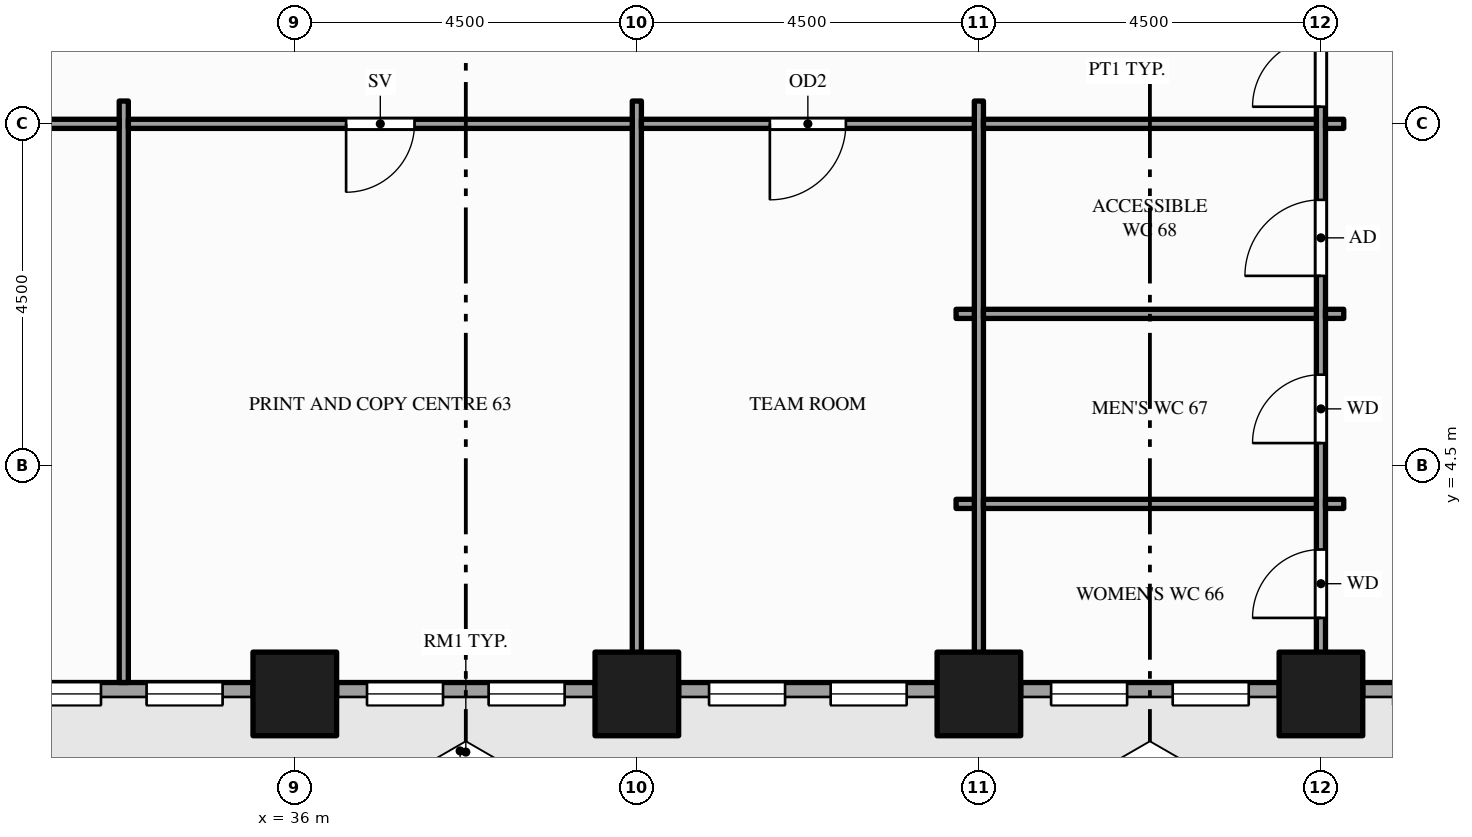
"""IFC4 building model, lengths in metres.
Left out: names, types, materials, properties, quantities, classifications, styles, units other than length and angle.
Written with IfcOpenShell. Run it as: python <this file> out.ifc"""

import sys

from ifc_helpers import new_model, si_unit, direction, frame, frame_2d, origin, origin_2d, place, context, subcontext, project, spatial, rectangle, hollow_rectangle, extrude, element, fill, save


model = new_model("IFC4")
c1 = context("Model", 3, precision=1e-05, world=origin(), true_north=direction((0.0, 1.0)))
c2 = subcontext(c1, "Body", "Model", "MODEL_VIEW")
j1 = project(units=[si_unit("LENGTHUNIT", "METRE"), si_unit("PLANEANGLEUNIT", "RADIAN")], contexts=[c1])
p1 = place(None, origin())
s1 = spatial("IfcSite", under=j1, at=p1, CompositionType="ELEMENT")
p2 = place(p1, origin())
s2 = spatial("IfcBuilding", under=s1, at=p2, CompositionType="ELEMENT")
p3 = place(p2, frame((0.0, 0.0, 29.0)))
s3 = spatial("IfcBuildingStorey", under=s2, at=p3, CompositionType="ELEMENT", Elevation=29.0)
for number, where, z_axis, x_axis in (
    (1, (36.0, 1.5, -0.3), (0.0, 0.0, 1.0), (1.0, 0.0, 0.0)),
    (2, (40.5, 1.5, -0.3), (0.0, 0.0, 1.0), (1.0, 0.0, 0.0)),
    (3, (45.0, 1.5, -0.3), (0.0, 0.0, 1.0), (1.0, 0.0, 0.0)),
    (4, (49.5, 1.5, -0.3), (0.0, 0.0, 1.0), (1.0, 0.0, 0.0)),
):
    element("IfcColumn", number, at=place(p3, frame(where, z_axis=z_axis, x_axis=x_axis)), inside=s3, PredefinedType="COLUMN", context=c2, shape_type="SweptSolid", body=[
        extrude(hollow_rectangle(XDim=1.1, YDim=1.1, WallThickness=0.06, at=origin_2d()), origin(), (0.0, 0.0, 1.0), 4.15),
    ])
p4 = place(p3, frame((32.05, 1.5, 0.0), z_axis=(0.0, 0.0, 1.0), x_axis=(1.0, 0.0, 0.0)))
e5 = element("IfcWall", 5, at=p4, inside=s3, PredefinedType="STANDARD", context=c2, shape_type="SweptSolid", body=[
    extrude(rectangle(XDim=3.4, YDim=0.3, at=frame_2d((1.7, 0.0))), origin(), (0.0, 0.0, 1.0), 3.144),
])
p5 = place(p4, frame((0.4, 0.0, 0.9)))
e6 = element("IfcOpeningElement", 6, at=p5, cuts=e5, PredefinedType="OPENING", context=c2, shape_type="SweptSolid", body=[
    extrude(rectangle(XDim=1.0, YDim=2.0, at=frame_2d((0.5, 1.0))), frame((0.0, 0.16, 0.0), z_axis=(0.0, -1.0, 0.0), x_axis=(1.0, 0.0, 0.0)), (0.0, 0.0, 1.0), 0.32),
])
p6 = place(p4, frame((2.0, 0.0, 0.9)))
e7 = element("IfcOpeningElement", 7, at=p6, cuts=e5, PredefinedType="OPENING", context=c2, shape_type="SweptSolid", body=[
    extrude(rectangle(XDim=1.0, YDim=2.0, at=frame_2d((0.5, 1.0))), frame((0.0, 0.16, 0.0), z_axis=(0.0, -1.0, 0.0), x_axis=(1.0, 0.0, 0.0)), (0.0, 0.0, 1.0), 0.32),
])
p7 = place(p3, frame((36.55, 1.5, 0.0), z_axis=(0.0, 0.0, 1.0), x_axis=(1.0, 0.0, 0.0)))
e8 = element("IfcWall", 8, at=p7, inside=s3, PredefinedType="STANDARD", context=c2, shape_type="SweptSolid", body=[
    extrude(rectangle(XDim=3.4, YDim=0.3, at=frame_2d((1.7, 0.0))), origin(), (0.0, 0.0, 1.0), 3.144),
])
p8 = place(p7, frame((0.4, 0.0, 0.9)))
e9 = element("IfcOpeningElement", 9, at=p8, cuts=e8, PredefinedType="OPENING", context=c2, shape_type="SweptSolid", body=[
    extrude(rectangle(XDim=1.0, YDim=2.0, at=frame_2d((0.5, 1.0))), frame((0.0, 0.16, 0.0), z_axis=(0.0, -1.0, 0.0), x_axis=(1.0, 0.0, 0.0)), (0.0, 0.0, 1.0), 0.32),
])
p9 = place(p7, frame((2.0, 0.0, 0.9)))
e10 = element("IfcOpeningElement", 10, at=p9, cuts=e8, PredefinedType="OPENING", context=c2, shape_type="SweptSolid", body=[
    extrude(rectangle(XDim=1.0, YDim=2.0, at=frame_2d((0.5, 1.0))), frame((0.0, 0.16, 0.0), z_axis=(0.0, -1.0, 0.0), x_axis=(1.0, 0.0, 0.0)), (0.0, 0.0, 1.0), 0.32),
])
p10 = place(p3, frame((41.05, 1.5, 0.0), z_axis=(0.0, 0.0, 1.0), x_axis=(1.0, 0.0, 0.0)))
e11 = element("IfcWall", 11, at=p10, inside=s3, PredefinedType="STANDARD", context=c2, shape_type="SweptSolid", body=[
    extrude(rectangle(XDim=3.4, YDim=0.3, at=frame_2d((1.7, 0.0))), origin(), (0.0, 0.0, 1.0), 3.144),
])
p11 = place(p10, frame((0.4, 0.0, 0.9)))
e12 = element("IfcOpeningElement", 12, at=p11, cuts=e11, PredefinedType="OPENING", context=c2, shape_type="SweptSolid", body=[
    extrude(rectangle(XDim=1.0, YDim=2.0, at=frame_2d((0.5, 1.0))), frame((0.0, 0.16, 0.0), z_axis=(0.0, -1.0, 0.0), x_axis=(1.0, 0.0, 0.0)), (0.0, 0.0, 1.0), 0.32),
])
p12 = place(p10, frame((2.0, 0.0, 0.9)))
e13 = element("IfcOpeningElement", 13, at=p12, cuts=e11, PredefinedType="OPENING", context=c2, shape_type="SweptSolid", body=[
    extrude(rectangle(XDim=1.0, YDim=2.0, at=frame_2d((0.5, 1.0))), frame((0.0, 0.16, 0.0), z_axis=(0.0, -1.0, 0.0), x_axis=(1.0, 0.0, 0.0)), (0.0, 0.0, 1.0), 0.32),
])
p13 = place(p3, frame((45.55, 1.5, 0.0), z_axis=(0.0, 0.0, 1.0), x_axis=(1.0, 0.0, 0.0)))
e14 = element("IfcWall", 14, at=p13, inside=s3, PredefinedType="STANDARD", context=c2, shape_type="SweptSolid", body=[
    extrude(rectangle(XDim=3.4, YDim=0.3, at=frame_2d((1.7, 0.0))), origin(), (0.0, 0.0, 1.0), 3.144),
])
p14 = place(p13, frame((0.4, 0.0, 0.9)))
e15 = element("IfcOpeningElement", 15, at=p14, cuts=e14, PredefinedType="OPENING", context=c2, shape_type="SweptSolid", body=[
    extrude(rectangle(XDim=1.0, YDim=2.0, at=frame_2d((0.5, 1.0))), frame((0.0, 0.16, 0.0), z_axis=(0.0, -1.0, 0.0), x_axis=(1.0, 0.0, 0.0)), (0.0, 0.0, 1.0), 0.32),
])
p15 = place(p13, frame((2.0, 0.0, 0.9)))
e16 = element("IfcOpeningElement", 16, at=p15, cuts=e14, PredefinedType="OPENING", context=c2, shape_type="SweptSolid", body=[
    extrude(rectangle(XDim=1.0, YDim=2.0, at=frame_2d((0.5, 1.0))), frame((0.0, 0.16, 0.0), z_axis=(0.0, -1.0, 0.0), x_axis=(1.0, 0.0, 0.0)), (0.0, 0.0, 1.0), 0.32),
])
p16 = place(p3, frame((50.05, 1.5, 0.0), z_axis=(0.0, 0.0, 1.0), x_axis=(1.0, 0.0, 0.0)))
e17 = element("IfcWall", 17, at=p16, inside=s3, PredefinedType="STANDARD", context=c2, shape_type="SweptSolid", body=[
    extrude(rectangle(XDim=3.95, YDim=0.3, at=frame_2d((1.975, 0.0))), origin(), (0.0, 0.0, 1.0), 3.144),
])
p17 = place(p16, frame((0.4, 0.0, 0.9)))
e18 = element("IfcOpeningElement", 18, at=p17, cuts=e17, PredefinedType="OPENING", context=c2, shape_type="SweptSolid", body=[
    extrude(rectangle(XDim=1.0, YDim=2.0, at=frame_2d((0.5, 1.0))), frame((0.0, 0.16, 0.0), z_axis=(0.0, -1.0, 0.0), x_axis=(1.0, 0.0, 0.0)), (0.0, 0.0, 1.0), 0.32),
])
p18 = place(p16, frame((2.0, 0.0, 0.9)))
e19 = element("IfcOpeningElement", 19, at=p18, cuts=e17, PredefinedType="OPENING", context=c2, shape_type="SweptSolid", body=[
    extrude(rectangle(XDim=1.55, YDim=2.0, at=frame_2d((0.775, 1.0))), frame((0.0, 0.16, 0.0), z_axis=(0.0, -1.0, 0.0), x_axis=(1.0, 0.0, 0.0)), (0.0, 0.0, 1.0), 0.32),
])
for number, where, z_axis, x_axis in (
    (20, (33.75, 1.65, 0.0), (0.0, 0.0, 1.0), (0.0, 1.0, 0.0)),
    (21, (40.5, 1.65, 0.0), (0.0, 0.0, 1.0), (0.0, 1.0, 0.0)),
    (22, (45.0, 1.65, 0.0), (0.0, 0.0, 1.0), (0.0, 1.0, 0.0)),
):
    element("IfcWall", number, at=place(p3, frame(where, z_axis=z_axis, x_axis=x_axis)), inside=s3, PredefinedType="PARTITIONING", context=c2, shape_type="SweptSolid", body=[
        extrude(rectangle(XDim=7.65, YDim=0.12, at=frame_2d((3.825, 0.0))), origin(), (0.0, 0.0, 1.0), 2.938),
    ])
p19 = place(p3, frame((49.5, 1.65, 0.0), z_axis=(0.0, 0.0, 1.0), x_axis=(0.0, 1.0, 0.0)))
e23 = element("IfcWall", 23, at=p19, inside=s3, PredefinedType="PARTITIONING", context=c2, shape_type="SweptSolid", body=[
    extrude(rectangle(XDim=22.2, YDim=0.12, at=frame_2d((11.1, 0.0))), origin(), (0.0, 0.0, 1.0), 2.938),
])
p20 = place(p19, frame((7.575, 0.0, 0.0)))
e24 = element("IfcOpeningElement", 24, at=p20, cuts=e23, PredefinedType="OPENING", context=c2, shape_type="SweptSolid", body=[
    extrude(rectangle(XDim=1.8, YDim=2.1, at=frame_2d((0.9, 1.05))), frame((0.0, 0.07, 0.0), z_axis=(0.0, -1.0, 0.0), x_axis=(1.0, 0.0, 0.0)), (0.0, 0.0, 1.0), 0.14),
])
p21 = place(p19, frame((0.85, 0.0, 0.0)))
e25 = element("IfcOpeningElement", 25, at=p21, cuts=e23, PredefinedType="OPENING", context=c2, shape_type="SweptSolid", body=[
    extrude(rectangle(XDim=0.9, YDim=2.1, at=frame_2d((0.45, 1.05))), frame((0.0, 0.07, 0.0), z_axis=(0.0, -1.0, 0.0), x_axis=(1.0, 0.0, 0.0)), (0.0, 0.0, 1.0), 0.14),
])
p22 = place(p19, frame((3.15, 0.0, 0.0)))
e26 = element("IfcOpeningElement", 26, at=p22, cuts=e23, PredefinedType="OPENING", context=c2, shape_type="SweptSolid", body=[
    extrude(rectangle(XDim=0.9, YDim=2.1, at=frame_2d((0.45, 1.05))), frame((0.0, 0.07, 0.0), z_axis=(0.0, -1.0, 0.0), x_axis=(1.0, 0.0, 0.0)), (0.0, 0.0, 1.0), 0.14),
])
p23 = place(p19, frame((5.35, 0.0, 0.0)))
e27 = element("IfcOpeningElement", 27, at=p23, cuts=e23, PredefinedType="OPENING", context=c2, shape_type="SweptSolid", body=[
    extrude(rectangle(XDim=1.0, YDim=2.1, at=frame_2d((0.5, 1.05))), frame((0.0, 0.07, 0.0), z_axis=(0.0, -1.0, 0.0), x_axis=(1.0, 0.0, 0.0)), (0.0, 0.0, 1.0), 0.14),
])
p24 = place(p3, frame((44.7, 4.0, 0.0), z_axis=(0.0, 0.0, 1.0), x_axis=(1.0, 0.0, 0.0)))
e28 = element("IfcWall", 28, at=p24, inside=s3, PredefinedType="PARTITIONING", context=c2, shape_type="SweptSolid", body=[
    extrude(rectangle(XDim=0.24, YDim=0.12, at=frame_2d((0.12, 0.0))), origin(), (0.0, 0.0, 1.0), 2.938),
])
p25 = place(p3, frame((45.06, 4.0, 0.0), z_axis=(0.0, 0.0, 1.0), x_axis=(1.0, 0.0, 0.0)))
e29 = element("IfcWall", 29, at=p25, inside=s3, PredefinedType="PARTITIONING", context=c2, shape_type="SweptSolid", body=[
    extrude(rectangle(XDim=4.38, YDim=0.12, at=frame_2d((2.19, 0.0))), origin(), (0.0, 0.0, 1.0), 2.938),
])
for number, where, z_axis, x_axis in (
    (30, (49.56, 4.0, 0.0), (0.0, 0.0, 1.0), (1.0, 0.0, 0.0)),
    (31, (44.7, 6.5, 0.0), (0.0, 0.0, 1.0), (1.0, 0.0, 0.0)),
):
    element("IfcWall", number, at=place(p3, frame(where, z_axis=z_axis, x_axis=x_axis)), inside=s3, PredefinedType="PARTITIONING", context=c2, shape_type="SweptSolid", body=[
        extrude(rectangle(XDim=0.24, YDim=0.12, at=frame_2d((0.12, 0.0))), origin(), (0.0, 0.0, 1.0), 2.938),
    ])
p26 = place(p3, frame((45.06, 6.5, 0.0), z_axis=(0.0, 0.0, 1.0), x_axis=(1.0, 0.0, 0.0)))
e32 = element("IfcWall", 32, at=p26, inside=s3, PredefinedType="PARTITIONING", context=c2, shape_type="SweptSolid", body=[
    extrude(rectangle(XDim=4.38, YDim=0.12, at=frame_2d((2.19, 0.0))), origin(), (0.0, 0.0, 1.0), 2.938),
])
p27 = place(p3, frame((49.56, 6.5, 0.0), z_axis=(0.0, 0.0, 1.0), x_axis=(1.0, 0.0, 0.0)))
e33 = element("IfcWall", 33, at=p27, inside=s3, PredefinedType="PARTITIONING", context=c2, shape_type="SweptSolid", body=[
    extrude(rectangle(XDim=0.24, YDim=0.12, at=frame_2d((0.12, 0.0))), origin(), (0.0, 0.0, 1.0), 2.938),
])
p28 = place(p3, frame((29.31, 9.0, 0.0), z_axis=(0.0, 0.0, 1.0), x_axis=(1.0, 0.0, 0.0)))
e34 = element("IfcWall", 34, at=p28, inside=s3, PredefinedType="PARTITIONING", context=c2, shape_type="SweptSolid", body=[
    extrude(rectangle(XDim=4.38, YDim=0.12, at=frame_2d((2.19, 0.0))), origin(), (0.0, 0.0, 1.0), 2.938),
])
p29 = place(p28, frame((1.69, 0.0, 0.0)))
e35 = element("IfcOpeningElement", 35, at=p29, cuts=e34, PredefinedType="OPENING", context=c2, shape_type="SweptSolid", body=[
    extrude(rectangle(XDim=1.0, YDim=2.1, at=frame_2d((0.5, 1.05))), frame((0.0, 0.07, 0.0), z_axis=(0.0, -1.0, 0.0), x_axis=(1.0, 0.0, 0.0)), (0.0, 0.0, 1.0), 0.14),
])
p30 = place(p3, frame((33.81, 9.0, 0.0), z_axis=(0.0, 0.0, 1.0), x_axis=(1.0, 0.0, 0.0)))
e36 = element("IfcWall", 36, at=p30, inside=s3, PredefinedType="PARTITIONING", context=c2, shape_type="SweptSolid", body=[
    extrude(rectangle(XDim=6.63, YDim=0.12, at=frame_2d((3.315, 0.0))), origin(), (0.0, 0.0, 1.0), 2.938),
])
p31 = place(p30, frame((2.865, 0.0, 0.0)))
e37 = element("IfcOpeningElement", 37, at=p31, cuts=e36, PredefinedType="OPENING", context=c2, shape_type="SweptSolid", body=[
    extrude(rectangle(XDim=0.9, YDim=2.1, at=frame_2d((0.45, 1.05))), frame((0.0, 0.07, 0.0), z_axis=(0.0, -1.0, 0.0), x_axis=(1.0, 0.0, 0.0)), (0.0, 0.0, 1.0), 0.14),
])
p32 = place(p3, frame((40.56, 9.0, 0.0), z_axis=(0.0, 0.0, 1.0), x_axis=(1.0, 0.0, 0.0)))
e38 = element("IfcWall", 38, at=p32, inside=s3, PredefinedType="PARTITIONING", context=c2, shape_type="SweptSolid", body=[
    extrude(rectangle(XDim=4.38, YDim=0.12, at=frame_2d((2.19, 0.0))), origin(), (0.0, 0.0, 1.0), 2.938),
])
p33 = place(p32, frame((1.69, 0.0, 0.0)))
e39 = element("IfcOpeningElement", 39, at=p33, cuts=e38, PredefinedType="OPENING", context=c2, shape_type="SweptSolid", body=[
    extrude(rectangle(XDim=1.0, YDim=2.1, at=frame_2d((0.5, 1.05))), frame((0.0, 0.07, 0.0), z_axis=(0.0, -1.0, 0.0), x_axis=(1.0, 0.0, 0.0)), (0.0, 0.0, 1.0), 0.14),
])
p34 = place(p3, frame((45.06, 9.0, 0.0), z_axis=(0.0, 0.0, 1.0), x_axis=(1.0, 0.0, 0.0)))
e40 = element("IfcWall", 40, at=p34, inside=s3, PredefinedType="PARTITIONING", context=c2, shape_type="SweptSolid", body=[
    extrude(rectangle(XDim=4.38, YDim=0.12, at=frame_2d((2.19, 0.0))), origin(), (0.0, 0.0, 1.0), 2.938),
])
p35 = place(p3, frame((49.56, 9.0, 0.0), z_axis=(0.0, 0.0, 1.0), x_axis=(1.0, 0.0, 0.0)))
e41 = element("IfcWall", 41, at=p35, inside=s3, PredefinedType="PARTITIONING", context=c2, shape_type="SweptSolid", body=[
    extrude(rectangle(XDim=0.24, YDim=0.12, at=frame_2d((0.12, 0.0))), origin(), (0.0, 0.0, 1.0), 2.938),
])
p36 = place(p5, origin())
e42 = element("IfcWindow", 42, at=p36, inside=s3, PartitioningType="SINGLE_PANEL", PredefinedType="WINDOW", context=c2, shape_type="SweptSolid", body=[
    extrude(rectangle(XDim=1.0, YDim=2.0, at=frame_2d((0.5, 1.0))), frame((0.0, 0.03, 0.0), z_axis=(0.0, -1.0, 0.0), x_axis=(1.0, 0.0, 0.0)), (0.0, 0.0, 1.0), 0.06),
])
fill(e6, e42)
p37 = place(p6, origin())
e43 = element("IfcWindow", 43, at=p37, inside=s3, PartitioningType="SINGLE_PANEL", PredefinedType="WINDOW", context=c2, shape_type="SweptSolid", body=[
    extrude(rectangle(XDim=1.0, YDim=2.0, at=frame_2d((0.5, 1.0))), frame((0.0, 0.03, 0.0), z_axis=(0.0, -1.0, 0.0), x_axis=(1.0, 0.0, 0.0)), (0.0, 0.0, 1.0), 0.06),
])
fill(e7, e43)
p38 = place(p8, origin())
e44 = element("IfcWindow", 44, at=p38, inside=s3, PartitioningType="SINGLE_PANEL", PredefinedType="WINDOW", context=c2, shape_type="SweptSolid", body=[
    extrude(rectangle(XDim=1.0, YDim=2.0, at=frame_2d((0.5, 1.0))), frame((0.0, 0.03, 0.0), z_axis=(0.0, -1.0, 0.0), x_axis=(1.0, 0.0, 0.0)), (0.0, 0.0, 1.0), 0.06),
])
fill(e9, e44)
p39 = place(p9, origin())
e45 = element("IfcWindow", 45, at=p39, inside=s3, PartitioningType="SINGLE_PANEL", PredefinedType="WINDOW", context=c2, shape_type="SweptSolid", body=[
    extrude(rectangle(XDim=1.0, YDim=2.0, at=frame_2d((0.5, 1.0))), frame((0.0, 0.03, 0.0), z_axis=(0.0, -1.0, 0.0), x_axis=(1.0, 0.0, 0.0)), (0.0, 0.0, 1.0), 0.06),
])
fill(e10, e45)
p40 = place(p11, origin())
e46 = element("IfcWindow", 46, at=p40, inside=s3, PartitioningType="SINGLE_PANEL", PredefinedType="WINDOW", context=c2, shape_type="SweptSolid", body=[
    extrude(rectangle(XDim=1.0, YDim=2.0, at=frame_2d((0.5, 1.0))), frame((0.0, 0.03, 0.0), z_axis=(0.0, -1.0, 0.0), x_axis=(1.0, 0.0, 0.0)), (0.0, 0.0, 1.0), 0.06),
])
fill(e12, e46)
p41 = place(p12, origin())
e47 = element("IfcWindow", 47, at=p41, inside=s3, PartitioningType="SINGLE_PANEL", PredefinedType="WINDOW", context=c2, shape_type="SweptSolid", body=[
    extrude(rectangle(XDim=1.0, YDim=2.0, at=frame_2d((0.5, 1.0))), frame((0.0, 0.03, 0.0), z_axis=(0.0, -1.0, 0.0), x_axis=(1.0, 0.0, 0.0)), (0.0, 0.0, 1.0), 0.06),
])
fill(e13, e47)
p42 = place(p14, origin())
e48 = element("IfcWindow", 48, at=p42, inside=s3, PartitioningType="SINGLE_PANEL", PredefinedType="WINDOW", context=c2, shape_type="SweptSolid", body=[
    extrude(rectangle(XDim=1.0, YDim=2.0, at=frame_2d((0.5, 1.0))), frame((0.0, 0.03, 0.0), z_axis=(0.0, -1.0, 0.0), x_axis=(1.0, 0.0, 0.0)), (0.0, 0.0, 1.0), 0.06),
])
fill(e15, e48)
p43 = place(p15, origin())
e49 = element("IfcWindow", 49, at=p43, inside=s3, PartitioningType="SINGLE_PANEL", PredefinedType="WINDOW", context=c2, shape_type="SweptSolid", body=[
    extrude(rectangle(XDim=1.0, YDim=2.0, at=frame_2d((0.5, 1.0))), frame((0.0, 0.03, 0.0), z_axis=(0.0, -1.0, 0.0), x_axis=(1.0, 0.0, 0.0)), (0.0, 0.0, 1.0), 0.06),
])
fill(e16, e49)
p44 = place(p20, origin())
e50 = element("IfcDoor", 50, at=p44, inside=s3, OperationType="DOUBLE_DOOR_SINGLE_SWING", PredefinedType="DOOR", context=c2, shape_type="SweptSolid", body=[
    extrude(rectangle(XDim=1.8, YDim=2.1, at=frame_2d((0.9, 1.05))), frame((0.0, 0.025, 0.0), z_axis=(0.0, -1.0, 0.0), x_axis=(1.0, 0.0, 0.0)), (0.0, 0.0, 1.0), 0.05),
])
fill(e24, e50)
p45 = place(p31, origin())
e51 = element("IfcDoor", 51, at=p45, inside=s3, OperationType="SINGLE_SWING_LEFT", PredefinedType="DOOR", context=c2, shape_type="SweptSolid", body=[
    extrude(rectangle(XDim=0.9, YDim=2.1, at=frame_2d((0.45, 1.05))), frame((0.0, 0.025, 0.0), z_axis=(0.0, -1.0, 0.0), x_axis=(1.0, 0.0, 0.0)), (0.0, 0.0, 1.0), 0.05),
])
fill(e37, e51)
p46 = place(p33, origin())
e52 = element("IfcDoor", 52, at=p46, inside=s3, OperationType="SINGLE_SWING_LEFT", PredefinedType="DOOR", context=c2, shape_type="SweptSolid", body=[
    extrude(rectangle(XDim=1.0, YDim=2.1, at=frame_2d((0.5, 1.05))), frame((0.0, 0.025, 0.0), z_axis=(0.0, -1.0, 0.0), x_axis=(1.0, 0.0, 0.0)), (0.0, 0.0, 1.0), 0.05),
])
fill(e39, e52)
p47 = place(p21, origin())
e53 = element("IfcDoor", 53, at=p47, inside=s3, OperationType="SINGLE_SWING_LEFT", PredefinedType="DOOR", context=c2, shape_type="SweptSolid", body=[
    extrude(rectangle(XDim=0.9, YDim=2.1, at=frame_2d((0.45, 1.05))), frame((0.0, 0.025, 0.0), z_axis=(0.0, -1.0, 0.0), x_axis=(1.0, 0.0, 0.0)), (0.0, 0.0, 1.0), 0.05),
])
fill(e25, e53)
p48 = place(p22, origin())
e54 = element("IfcDoor", 54, at=p48, inside=s3, OperationType="SINGLE_SWING_LEFT", PredefinedType="DOOR", context=c2, shape_type="SweptSolid", body=[
    extrude(rectangle(XDim=0.9, YDim=2.1, at=frame_2d((0.45, 1.05))), frame((0.0, 0.025, 0.0), z_axis=(0.0, -1.0, 0.0), x_axis=(1.0, 0.0, 0.0)), (0.0, 0.0, 1.0), 0.05),
])
fill(e26, e54)
p49 = place(p23, origin())
e55 = element("IfcDoor", 55, at=p49, inside=s3, OperationType="SINGLE_SWING_LEFT", PredefinedType="DOOR", context=c2, shape_type="SweptSolid", body=[
    extrude(rectangle(XDim=1.0, YDim=2.1, at=frame_2d((0.5, 1.05))), frame((0.0, 0.025, 0.0), z_axis=(0.0, -1.0, 0.0), x_axis=(1.0, 0.0, 0.0)), (0.0, 0.0, 1.0), 0.05),
])
fill(e27, e55)
save(model, sys.argv[1])
